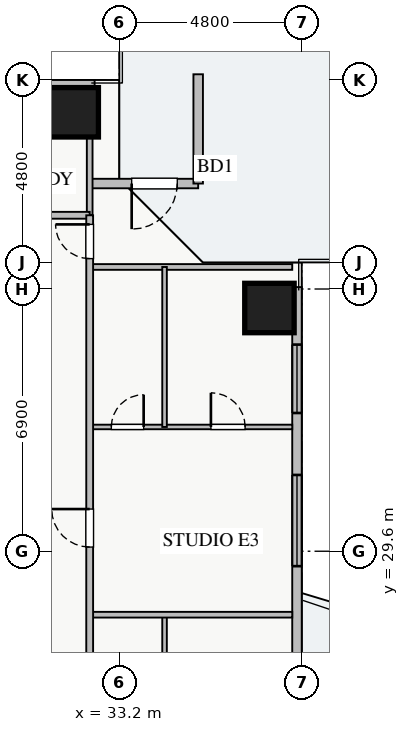
"""IFC4 building model, lengths in metres.
Left out: names, types, materials, properties, quantities, classifications, styles, units other than length and angle.
Written with IfcOpenShell. Run it as: python <this file> out.ifc"""

import sys

from ifc_helpers import new_model, si_unit, direction, frame, frame_2d, origin, origin_2d, place, context, subcontext, project, spatial, rectangle, extrude, source, transform, mapped, element, fill, save


model = new_model("IFC4")
c1 = context("Model", 3, precision=1e-05, world=origin(), true_north=direction((0.0, 1.0)))
c2 = subcontext(c1, "Body", "Model", "MODEL_VIEW")
j1 = project(units=[si_unit("LENGTHUNIT", "METRE"), si_unit("PLANEANGLEUNIT", "RADIAN")], contexts=[c1])
p1 = place(None, origin())
s1 = spatial("IfcSite", under=j1, at=p1, CompositionType="ELEMENT")
p2 = place(p1, origin())
s2 = spatial("IfcBuilding", under=s1, at=p2, CompositionType="ELEMENT")
p3 = place(p2, frame((0.0, 0.0, 82.75)))
s3 = spatial("IfcBuildingStorey", under=s2, at=p3, CompositionType="ELEMENT", Elevation=82.75)
m1 = source(origin(), c2, "Body", "SweptSolid", [
    extrude(rectangle(XDim=1.3, YDim=1.3, at=origin_2d()), origin(), (0.0, 0.0, 1.0), 3.25),
])
for number, where, z_axis, x_axis in (
    (1, (37.15, 36.0, 0.0), (0.0, 0.0, 1.0), (1.0, 0.0, 0.0)),
    (2, (32.0, 41.15, 0.0), (0.0, 0.0, 1.0), (1.0, 0.0, 0.0)),
):
    element("IfcColumn", number, at=place(p3, frame(where, z_axis=z_axis, x_axis=x_axis)), inside=s3, PredefinedType="COLUMN", context=c2, shape_type="MappedRepresentation", body=[
        mapped(m1, transform((0.0, 0.0, 0.0), x_axis=(1.0, 0.0, 0.0), y_axis=(0.0, 1.0, 0.0), z_axis=(0.0, 0.0, 1.0), scale=1.0)),
    ])
p4 = place(p3, frame((5.45, 41.875, 0.0), z_axis=(0.0, 0.0, 1.0), x_axis=(1.0, 0.0, 0.0)))
e3 = element("IfcWall", 3, at=p4, inside=s3, PredefinedType="STANDARD", context=c2, shape_type="SweptSolid", body=[
    extrude(rectangle(XDim=27.1, YDim=0.25, at=frame_2d((13.55, 0.0))), origin(), (0.0, 0.0, 1.0), 2.61),
])
p5 = place(p4, frame((14.4, 0.0, 0.0)))
e4 = element("IfcOpeningElement", 4, at=p5, cuts=e3, PredefinedType="OPENING", context=c2, shape_type="SweptSolid", body=[
    extrude(rectangle(XDim=1.2, YDim=2.1, at=frame_2d((0.6, 1.05))), frame((0.0, 0.135, 0.0), z_axis=(0.0, -1.0, 0.0), x_axis=(1.0, 0.0, 0.0)), (0.0, 0.0, 1.0), 0.27),
])
p6 = place(p4, frame((1.365, 0.0, 0.9)))
e5 = element("IfcOpeningElement", 5, at=p6, cuts=e3, PredefinedType="OPENING", context=c2, shape_type="SweptSolid", body=[
    extrude(rectangle(XDim=1.8, YDim=1.5, at=frame_2d((0.9, 0.75))), frame((0.0, 0.135, 0.0), z_axis=(0.0, -1.0, 0.0), x_axis=(1.0, 0.0, 0.0)), (0.0, 0.0, 1.0), 0.27),
])
p7 = place(p4, frame((9.263, 0.0, 0.9)))
e6 = element("IfcOpeningElement", 6, at=p7, cuts=e3, PredefinedType="OPENING", context=c2, shape_type="SweptSolid", body=[
    extrude(rectangle(XDim=1.8, YDim=1.45, at=frame_2d((0.9, 0.725))), frame((0.0, 0.135, 0.0), z_axis=(0.0, -1.0, 0.0), x_axis=(1.0, 0.0, 0.0)), (0.0, 0.0, 1.0), 0.27),
])
p8 = place(p4, frame((16.188, 0.0, 0.9)))
e7 = element("IfcOpeningElement", 7, at=p8, cuts=e3, PredefinedType="OPENING", context=c2, shape_type="SweptSolid", body=[
    extrude(rectangle(XDim=1.5, YDim=1.45, at=frame_2d((0.75, 0.725))), frame((0.0, 0.135, 0.0), z_axis=(0.0, -1.0, 0.0), x_axis=(1.0, 0.0, 0.0)), (0.0, 0.0, 1.0), 0.27),
])
p9 = place(p4, frame((22.663, 0.0, 0.9)))
e8 = element("IfcOpeningElement", 8, at=p9, cuts=e3, PredefinedType="OPENING", context=c2, shape_type="SweptSolid", body=[
    extrude(rectangle(XDim=2.1, YDim=1.48, at=frame_2d((1.05, 0.74))), frame((0.0, 0.135, 0.0), z_axis=(0.0, -1.0, 0.0), x_axis=(1.0, 0.0, 0.0)), (0.0, 0.0, 1.0), 0.27),
])
p10 = place(p4, frame((5.149, 0.0, 0.9)))
e9 = element("IfcOpeningElement", 9, at=p10, cuts=e3, PredefinedType="OPENING", context=c2, shape_type="SweptSolid", body=[
    extrude(rectangle(XDim=2.4, YDim=1.5, at=frame_2d((1.2, 0.75))), frame((0.0, 0.135, 0.0), z_axis=(0.0, -1.0, 0.0), x_axis=(1.0, 0.0, 0.0)), (0.0, 0.0, 1.0), 0.27),
])
p11 = place(p3, frame((37.875, 9.45, 0.0), z_axis=(0.0, 0.0, 1.0), x_axis=(0.0, 1.0, 0.0)))
e10 = element("IfcWall", 10, at=p11, inside=s3, PredefinedType="STANDARD", context=c2, shape_type="SweptSolid", body=[
    extrude(rectangle(XDim=27.1, YDim=0.25, at=frame_2d((13.55, 0.0))), origin(), (0.0, 0.0, 1.0), 2.61),
])
p12 = place(p11, frame((14.4, 0.0, 0.0)))
e11 = element("IfcOpeningElement", 11, at=p12, cuts=e10, PredefinedType="OPENING", context=c2, shape_type="SweptSolid", body=[
    extrude(rectangle(XDim=1.2, YDim=2.1, at=frame_2d((0.6, 1.05))), frame((0.0, 0.135, 0.0), z_axis=(0.0, -1.0, 0.0), x_axis=(1.0, 0.0, 0.0)), (0.0, 0.0, 1.0), 0.27),
])
p13 = place(p11, frame((2.188, 0.0, 0.9)))
e12 = element("IfcOpeningElement", 12, at=p13, cuts=e10, PredefinedType="OPENING", context=c2, shape_type="SweptSolid", body=[
    extrude(rectangle(XDim=2.4, YDim=1.48, at=frame_2d((1.2, 0.74))), frame((0.0, 0.135, 0.0), z_axis=(0.0, -1.0, 0.0), x_axis=(1.0, 0.0, 0.0)), (0.0, 0.0, 1.0), 0.27),
])
p14 = place(p11, frame((23.788, 0.0, 0.9)))
e13 = element("IfcOpeningElement", 13, at=p14, cuts=e10, PredefinedType="OPENING", context=c2, shape_type="SweptSolid", body=[
    extrude(rectangle(XDim=1.8, YDim=1.5, at=frame_2d((0.9, 0.75))), frame((0.0, 0.135, 0.0), z_axis=(0.0, -1.0, 0.0), x_axis=(1.0, 0.0, 0.0)), (0.0, 0.0, 1.0), 0.27),
])
p15 = place(p11, frame((19.758, 0.0, 0.9)))
e14 = element("IfcOpeningElement", 14, at=p15, cuts=e10, PredefinedType="OPENING", context=c2, shape_type="SweptSolid", body=[
    extrude(rectangle(XDim=2.4, YDim=1.5, at=frame_2d((1.2, 0.75))), frame((0.0, 0.135, 0.0), z_axis=(0.0, -1.0, 0.0), x_axis=(1.0, 0.0, 0.0)), (0.0, 0.0, 1.0), 0.27),
])
p16 = place(p11, frame((8.635, 0.0, 0.9)))
e15 = element("IfcOpeningElement", 15, at=p16, cuts=e10, PredefinedType="OPENING", context=c2, shape_type="SweptSolid", body=[
    extrude(rectangle(XDim=0.9, YDim=1.2, at=frame_2d((0.45, 0.6))), frame((0.0, 0.135, 0.0), z_axis=(0.0, -1.0, 0.0), x_axis=(1.0, 0.0, 0.0)), (0.0, 0.0, 1.0), 0.27),
])
p17 = place(p3, frame((32.475, 39.275, 0.0), z_axis=(0.0, 0.0, 1.0), x_axis=(1.0, 0.0, 0.0)))
e16 = element("IfcWall", 16, at=p17, inside=s3, PredefinedType="STANDARD", context=c2, shape_type="SweptSolid", body=[
    extrude(rectangle(XDim=2.8, YDim=0.25, at=frame_2d((1.4, 0.0))), origin(), (0.0, 0.0, 1.0), 2.61),
])
p18 = place(p17, frame((1.05, 0.0, 0.0)))
e17 = element("IfcOpeningElement", 17, at=p18, cuts=e16, PredefinedType="OPENING", context=c2, shape_type="SweptSolid", body=[
    extrude(rectangle(XDim=1.2, YDim=2.1, at=frame_2d((0.6, 1.05))), frame((0.0, 0.135, 0.0), z_axis=(0.0, -1.0, 0.0), x_axis=(1.0, 0.0, 0.0)), (0.0, 0.0, 1.0), 0.27),
])
p19 = place(p3, frame((35.275, 39.275, 0.0), z_axis=(0.0, 0.0, 1.0), x_axis=(0.0, 1.0, 0.0)))
e18 = element("IfcWall", 18, at=p19, inside=s3, PredefinedType="STANDARD", context=c2, shape_type="SweptSolid", body=[
    extrude(rectangle(XDim=2.875, YDim=0.25, at=frame_2d((1.438, 0.0))), origin(), (0.0, 0.0, 1.0), 2.61),
])
p20 = place(p3, frame((32.42, 38.44, 0.0), z_axis=(0.0, 0.0, 1.0), x_axis=(0.0, 1.0, 0.0)))
e19 = element("IfcWall", 19, at=p20, inside=s3, PredefinedType="PARTITIONING", context=c2, shape_type="SweptSolid", body=[
    extrude(rectangle(XDim=3.31, YDim=0.15, at=frame_2d((1.655, 0.0))), origin(), (0.0, 0.0, 1.0), 3.07),
])
p21 = place(p3, frame((8.85, 38.44, 0.0), z_axis=(0.0, 0.0, 1.0), x_axis=(1.0, 0.0, 0.0)))
e20 = element("IfcWall", 20, at=p21, inside=s3, PredefinedType="PARTITIONING", context=c2, shape_type="SweptSolid", body=[
    extrude(rectangle(XDim=23.57, YDim=0.18, at=frame_2d((11.785, 0.0))), origin(), (0.0, 0.0, 1.0), 3.07),
])
p22 = place(p21, frame((4.625, 0.0, 0.0)))
e21 = element("IfcOpeningElement", 21, at=p22, cuts=e20, PredefinedType="OPENING", context=c2, shape_type="SweptSolid", body=[
    extrude(rectangle(XDim=1.0, YDim=2.05, at=frame_2d((0.5, 1.025))), frame((0.0, 0.1, 0.0), z_axis=(0.0, -1.0, 0.0), x_axis=(1.0, 0.0, 0.0)), (0.0, 0.0, 1.0), 0.2),
])
p23 = place(p21, frame((16.41, 0.0, 0.0)))
e22 = element("IfcOpeningElement", 22, at=p23, cuts=e20, PredefinedType="OPENING", context=c2, shape_type="SweptSolid", body=[
    extrude(rectangle(XDim=1.0, YDim=2.05, at=frame_2d((0.5, 1.025))), frame((0.0, 0.1, 0.0), z_axis=(0.0, -1.0, 0.0), x_axis=(1.0, 0.0, 0.0)), (0.0, 0.0, 1.0), 0.2),
])
p24 = place(p3, frame((32.42, 37.08, 0.0), z_axis=(0.0, 0.0, 1.0), x_axis=(1.0, 0.0, 0.0)))
e23 = element("IfcWall", 23, at=p24, inside=s3, PredefinedType="PARTITIONING", context=c2, shape_type="SweptSolid", body=[
    extrude(rectangle(XDim=5.33, YDim=0.15, at=frame_2d((2.665, 0.0))), origin(), (0.0, 0.0, 1.0), 3.07),
])
p25 = place(p3, frame((34.39, 23.1, 0.0), z_axis=(0.0, 0.0, 1.0), x_axis=(0.0, 1.0, 0.0)))
e24 = element("IfcWall", 24, at=p25, inside=s3, PredefinedType="PLUMBINGWALL", context=c2, shape_type="SweptSolid", body=[
    extrude(rectangle(XDim=4.83, YDim=0.12, at=frame_2d((2.415, 0.0))), origin(), (0.0, 0.0, 1.0), 3.07),
])
p26 = place(p3, frame((32.42, 32.87, 0.0), z_axis=(0.0, 0.0, 1.0), x_axis=(1.0, 0.0, 0.0)))
e25 = element("IfcWall", 25, at=p26, inside=s3, PredefinedType="PLUMBINGWALL", context=c2, shape_type="SweptSolid", body=[
    extrude(rectangle(XDim=5.33, YDim=0.12, at=frame_2d((2.665, 0.0))), origin(), (0.0, 0.0, 1.0), 3.07),
])
p27 = place(p26, frame((0.57, 0.0, 0.0)))
e26 = element("IfcOpeningElement", 26, at=p27, cuts=e25, PredefinedType="OPENING", context=c2, shape_type="SweptSolid", body=[
    extrude(rectangle(XDim=0.85, YDim=2.05, at=frame_2d((0.425, 1.025))), frame((0.0, 0.07, 0.0), z_axis=(0.0, -1.0, 0.0), x_axis=(1.0, 0.0, 0.0)), (0.0, 0.0, 1.0), 0.14),
])
p28 = place(p26, frame((3.19, 0.0, 0.0)))
e27 = element("IfcOpeningElement", 27, at=p28, cuts=e25, PredefinedType="OPENING", context=c2, shape_type="SweptSolid", body=[
    extrude(rectangle(XDim=0.9, YDim=2.05, at=frame_2d((0.45, 1.025))), frame((0.0, 0.07, 0.0), z_axis=(0.0, -1.0, 0.0), x_axis=(1.0, 0.0, 0.0)), (0.0, 0.0, 1.0), 0.14),
])
p29 = place(p3, frame((34.39, 32.87, 0.0), z_axis=(0.0, 0.0, 1.0), x_axis=(0.0, 1.0, 0.0)))
e28 = element("IfcWall", 28, at=p29, inside=s3, PredefinedType="PLUMBINGWALL", context=c2, shape_type="SweptSolid", body=[
    extrude(rectangle(XDim=4.21, YDim=0.12, at=frame_2d((2.105, 0.0))), origin(), (0.0, 0.0, 1.0), 3.07),
])
p30 = place(p3, frame((32.42, 27.93, 0.0), z_axis=(0.0, 0.0, 1.0), x_axis=(1.0, 0.0, 0.0)))
e29 = element("IfcWall", 29, at=p30, inside=s3, PredefinedType="PARTITIONING", context=c2, shape_type="SweptSolid", body=[
    extrude(rectangle(XDim=5.33, YDim=0.15, at=frame_2d((2.665, 0.0))), origin(), (0.0, 0.0, 1.0), 2.771),
])
p31 = place(p3, frame((32.42, 7.21, 0.0), z_axis=(0.0, 0.0, 1.0), x_axis=(0.0, 1.0, 0.0)))
e30 = element("IfcWall", 30, at=p31, inside=s3, PredefinedType="PARTITIONING", context=c2, shape_type="SweptSolid", body=[
    extrude(rectangle(XDim=31.23, YDim=0.18, at=frame_2d((15.615, 0.0))), origin(), (0.0, 0.0, 1.0), 2.865),
])
p32 = place(p31, frame((30.09, 0.0, 0.0)))
e31 = element("IfcOpeningElement", 31, at=p32, cuts=e30, PredefinedType="OPENING", context=c2, shape_type="SweptSolid", body=[
    extrude(rectangle(XDim=0.9, YDim=2.05, at=frame_2d((0.45, 1.025))), frame((0.0, 0.1, 0.0), z_axis=(0.0, -1.0, 0.0), x_axis=(1.0, 0.0, 0.0)), (0.0, 0.0, 1.0), 0.2),
])
p33 = place(p31, frame((0.415, 0.0, 0.0)))
e32 = element("IfcOpeningElement", 32, at=p33, cuts=e30, PredefinedType="OPENING", context=c2, shape_type="SweptSolid", body=[
    extrude(rectangle(XDim=0.9, YDim=2.05, at=frame_2d((0.45, 1.025))), frame((0.0, 0.1, 0.0), z_axis=(0.0, -1.0, 0.0), x_axis=(1.0, 0.0, 0.0)), (0.0, 0.0, 1.0), 0.2),
])
p34 = place(p31, frame((5.675, 0.0, 0.0)))
e33 = element("IfcOpeningElement", 33, at=p34, cuts=e30, PredefinedType="OPENING", context=c2, shape_type="SweptSolid", body=[
    extrude(rectangle(XDim=1.0, YDim=2.05, at=frame_2d((0.5, 1.025))), frame((0.0, 0.1, 0.0), z_axis=(0.0, -1.0, 0.0), x_axis=(1.0, 0.0, 0.0)), (0.0, 0.0, 1.0), 0.2),
])
p35 = place(p31, frame((12.575, 0.0, 0.0)))
e34 = element("IfcOpeningElement", 34, at=p35, cuts=e30, PredefinedType="OPENING", context=c2, shape_type="SweptSolid", body=[
    extrude(rectangle(XDim=1.0, YDim=2.05, at=frame_2d((0.5, 1.025))), frame((0.0, 0.1, 0.0), z_axis=(0.0, -1.0, 0.0), x_axis=(1.0, 0.0, 0.0)), (0.0, 0.0, 1.0), 0.2),
])
p36 = place(p31, frame((22.5, 0.0, 0.0)))
e35 = element("IfcOpeningElement", 35, at=p36, cuts=e30, PredefinedType="OPENING", context=c2, shape_type="SweptSolid", body=[
    extrude(rectangle(XDim=1.0, YDim=2.05, at=frame_2d((0.5, 1.025))), frame((0.0, 0.1, 0.0), z_axis=(0.0, -1.0, 0.0), x_axis=(1.0, 0.0, 0.0)), (0.0, 0.0, 1.0), 0.2),
])
m2 = source(origin(), c2, "Body", "SweptSolid", [
    extrude(rectangle(XDim=1.8, YDim=1.5, at=frame_2d((0.9, 0.75))), frame((0.0, 0.03, 0.0), z_axis=(0.0, -1.0, 0.0), x_axis=(1.0, 0.0, 0.0)), (0.0, 0.0, 1.0), 0.06),
])
p37 = place(p14, origin())
e36 = element("IfcWindow", 36, at=p37, inside=s3, PartitioningType="TRIPLE_PANEL_VERTICAL", PredefinedType="WINDOW", context=c2, shape_type="MappedRepresentation", body=[
    mapped(m2, transform((0.0, 0.0, 0.0), x_axis=(1.0, 0.0, 0.0), y_axis=(0.0, 1.0, 0.0), z_axis=(0.0, 0.0, 1.0), scale=1.0)),
])
fill(e13, e36)
m3 = source(origin(), c2, "Body", "SweptSolid", [
    extrude(rectangle(XDim=1.2, YDim=2.1, at=frame_2d((0.6, 1.05))), frame((0.0, 0.025, 0.0), z_axis=(0.0, -1.0, 0.0), x_axis=(1.0, 0.0, 0.0)), (0.0, 0.0, 1.0), 0.05),
])
p38 = place(p18, frame((1.2, 0.0, 0.0), z_axis=(0.0, 0.0, 1.0), x_axis=(-1.0, 0.0, 0.0)))
e37 = element("IfcDoor", 37, at=p38, inside=s3, OperationType="SINGLE_SWING_LEFT", PredefinedType="DOOR", context=c2, shape_type="MappedRepresentation", body=[
    mapped(m3, transform((0.0, 0.0, 0.0), x_axis=(1.0, 0.0, 0.0), y_axis=(0.0, 1.0, 0.0), z_axis=(0.0, 0.0, 1.0), scale=1.0)),
])
fill(e17, e37)
m4 = source(origin(), c2, "Body", "SweptSolid", [
    extrude(rectangle(XDim=0.85, YDim=2.05, at=frame_2d((0.425, 1.025))), frame((0.0, 0.025, 0.0), z_axis=(0.0, -1.0, 0.0), x_axis=(1.0, 0.0, 0.0)), (0.0, 0.0, 1.0), 0.05),
])
p39 = place(p27, origin())
e38 = element("IfcDoor", 38, at=p39, inside=s3, OperationType="SINGLE_SWING_RIGHT", PredefinedType="DOOR", context=c2, shape_type="MappedRepresentation", body=[
    mapped(m4, transform((0.0, 0.0, 0.0), x_axis=(1.0, 0.0, 0.0), y_axis=(0.0, 1.0, 0.0), z_axis=(0.0, 0.0, 1.0), scale=1.0)),
])
fill(e26, e38)
m5 = source(origin(), c2, "Body", "SweptSolid", [
    extrude(rectangle(XDim=0.9, YDim=2.05, at=frame_2d((0.45, 1.025))), frame((0.0, 0.025, 0.0), z_axis=(0.0, -1.0, 0.0), x_axis=(1.0, 0.0, 0.0)), (0.0, 0.0, 1.0), 0.05),
])
p40 = place(p28, origin())
e39 = element("IfcDoor", 39, at=p40, inside=s3, OperationType="SINGLE_SWING_LEFT", PredefinedType="DOOR", context=c2, shape_type="MappedRepresentation", body=[
    mapped(m5, transform((0.0, 0.0, 0.0), x_axis=(1.0, 0.0, 0.0), y_axis=(0.0, 1.0, 0.0), z_axis=(0.0, 0.0, 1.0), scale=1.0)),
])
fill(e27, e39)
p41 = place(p32, origin())
e40 = element("IfcDoor", 40, at=p41, inside=s3, OperationType="SINGLE_SWING_RIGHT", PredefinedType="DOOR", context=c2, shape_type="MappedRepresentation", body=[
    mapped(m5, transform((0.0, 0.0, 0.0), x_axis=(1.0, 0.0, 0.0), y_axis=(0.0, 1.0, 0.0), z_axis=(0.0, 0.0, 1.0), scale=1.0)),
])
fill(e31, e40)
m6 = source(origin(), c2, "Body", "SweptSolid", [
    extrude(rectangle(XDim=1.0, YDim=2.05, at=frame_2d((0.5, 1.025))), frame((0.0, 0.025, 0.0), z_axis=(0.0, -1.0, 0.0), x_axis=(1.0, 0.0, 0.0)), (0.0, 0.0, 1.0), 0.05),
])
p42 = place(p36, origin())
e41 = element("IfcDoor", 41, at=p42, inside=s3, OperationType="SINGLE_SWING_RIGHT", PredefinedType="DOOR", context=c2, shape_type="MappedRepresentation", body=[
    mapped(m6, transform((0.0, 0.0, 0.0), x_axis=(1.0, 0.0, 0.0), y_axis=(0.0, 1.0, 0.0), z_axis=(0.0, 0.0, 1.0), scale=1.0)),
])
fill(e35, e41)
m7 = source(origin(), c2, "Body", "SweptSolid", [
    extrude(rectangle(XDim=2.4, YDim=1.5, at=frame_2d((1.2, 0.75))), frame((0.0, 0.03, 0.0), z_axis=(0.0, -1.0, 0.0), x_axis=(1.0, 0.0, 0.0)), (0.0, 0.0, 1.0), 0.06),
])
p43 = place(p15, origin())
e42 = element("IfcWindow", 42, at=p43, inside=s3, PartitioningType="TRIPLE_PANEL_VERTICAL", PredefinedType="WINDOW", context=c2, shape_type="MappedRepresentation", body=[
    mapped(m7, transform((0.0, 0.0, 0.0), x_axis=(1.0, 0.0, 0.0), y_axis=(0.0, 1.0, 0.0), z_axis=(0.0, 0.0, 1.0), scale=1.0)),
])
fill(e14, e42)
save(model, sys.argv[1])
